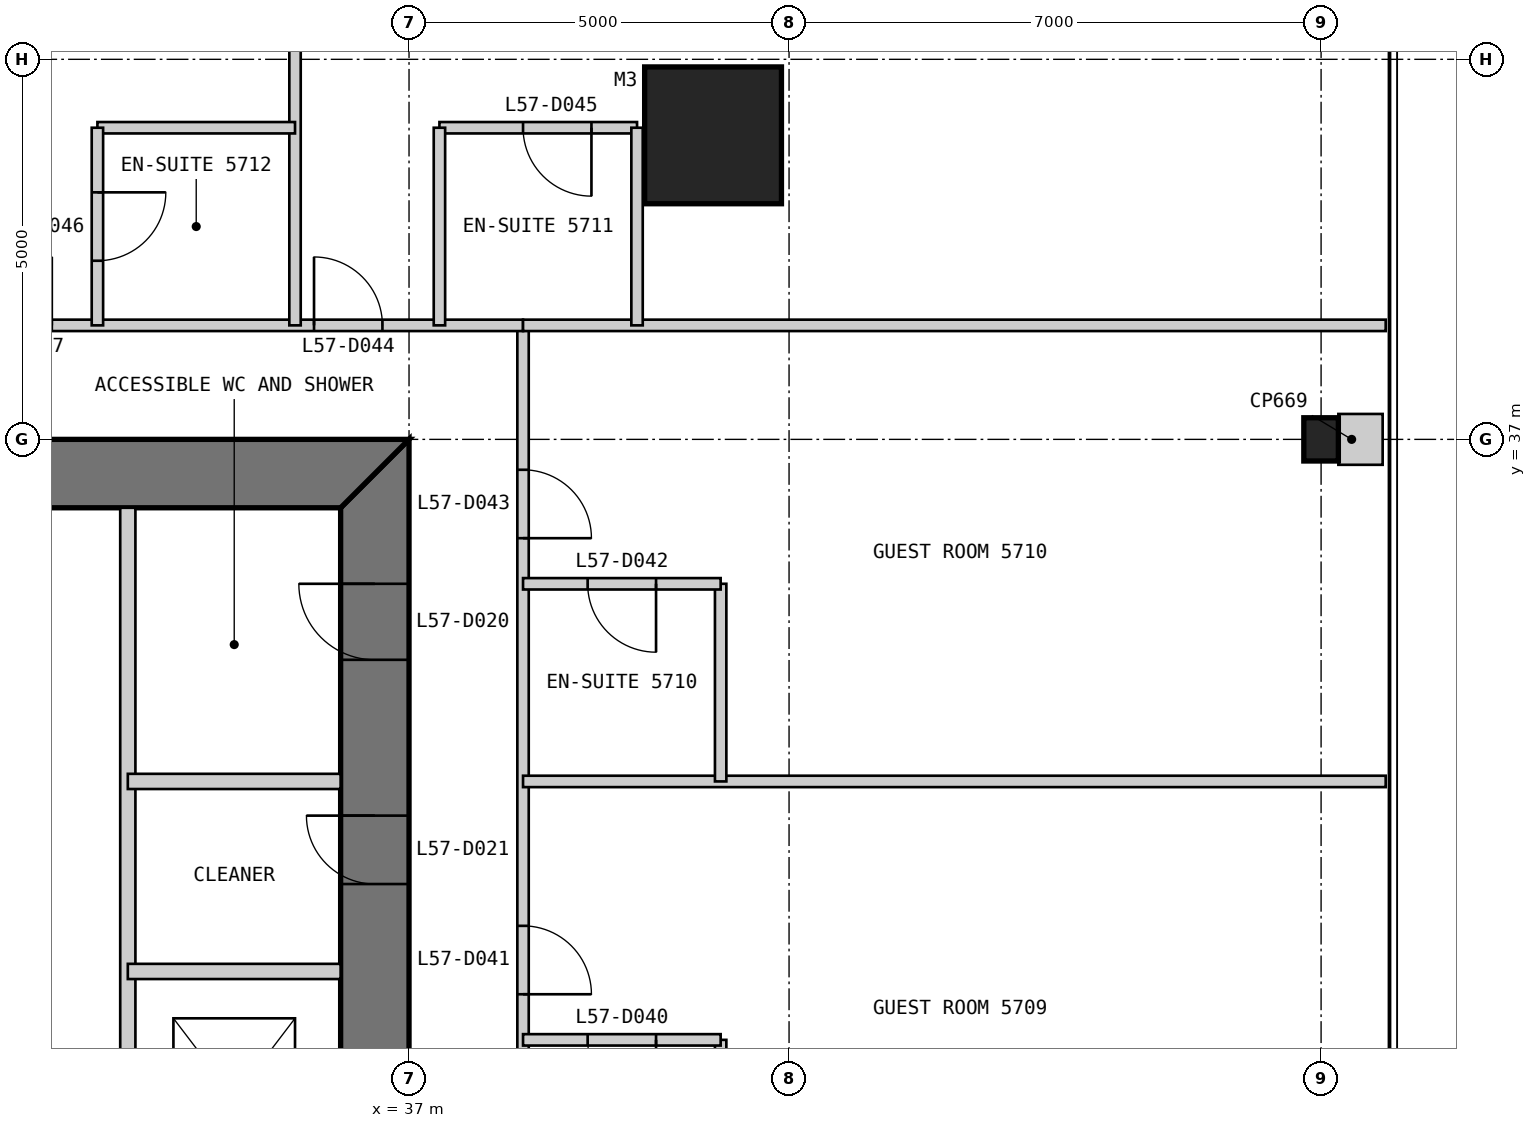
"""IFC4 building model, lengths in metres.
Left out: names, types, materials, properties, quantities, classifications, styles, units other than length and angle.
Written with IfcOpenShell. Run it as: python <this file> out.ifc"""

import sys

from ifc_helpers import new_model, si_unit, direction, frame, frame_2d, origin, origin_2d, place, context, subcontext, project, spatial, polyline, rectangle, i_section, outline, extrude, element, fill, save


model = new_model("IFC4")
c1 = context("Model", 3, precision=1e-05, world=origin(), true_north=direction((0.0, 1.0)))
c2 = subcontext(c1, "Body", "Model", "MODEL_VIEW")
j1 = project(units=[si_unit("LENGTHUNIT", "METRE"), si_unit("PLANEANGLEUNIT", "RADIAN")], contexts=[c1])
p1 = place(None, origin())
s1 = spatial("IfcSite", under=j1, at=p1, CompositionType="ELEMENT")
p2 = place(p1, origin())
s2 = spatial("IfcBuilding", under=s1, at=p2, CompositionType="ELEMENT")
p3 = place(p2, frame((0.0, 0.0, 245.8)))
s3 = spatial("IfcBuildingStorey", under=s2, at=p3, CompositionType="ELEMENT", Elevation=245.8)
p4 = place(p3, frame((41.0, 41.0, 0.0), z_axis=(0.0, 0.0, 1.0), x_axis=(1.0, 0.0, 0.0)))
e1 = element("IfcColumn", 1, at=p4, inside=s3, PredefinedType="COLUMN", context=c2, shape_type="SweptSolid", body=[
    extrude(rectangle(XDim=1.8, YDim=1.8, at=origin_2d()), origin(), (0.0, 0.0, 1.0), 3.4),
])
p5 = place(p3, frame((49.0, 37.0, 0.0), z_axis=(0.0, 0.0, 1.0), x_axis=(1.0, 0.0, 0.0)))
e2 = element("IfcColumn", 2, at=p5, inside=s3, PredefinedType="COLUMN", context=c2, shape_type="SweptSolid", body=[
    extrude(i_section(OverallWidth=0.455, OverallDepth=0.569, WebThickness=0.078, FlangeThickness=0.125, at=origin_2d()), origin(), (0.0, 0.0, 1.0), 3.4),
])
p6 = place(p3, frame((36.55, 13.9, 0.0), z_axis=(0.0, 0.0, 1.0), x_axis=(0.0, 1.0, 0.0)))
e3 = element("IfcWall", 3, at=p6, inside=s3, PredefinedType="SHEAR", context=c2, shape_type="SweptSolid", body=[
    extrude(outline(polyline([(-0.9, -0.45), (23.1, -0.45), (22.2, 0.45), (0.0, 0.45), (-0.9, -0.45)])), origin(), (0.0, 0.0, 1.0), 3.4),
])
p7 = place(p6, frame((20.2, 0.0, 0.0)))
e4 = element("IfcOpeningElement", 4, at=p7, cuts=e3, PredefinedType="OPENING", context=c2, shape_type="SweptSolid", body=[
    extrude(rectangle(XDim=1.0, YDim=2.2, at=frame_2d((0.5, 1.1))), frame((0.0, 0.46, 0.0), z_axis=(0.0, -1.0, 0.0), x_axis=(1.0, 0.0, 0.0)), (0.0, 0.0, 1.0), 0.92),
])
p8 = place(p6, frame((17.25, 0.0, 0.0)))
e5 = element("IfcOpeningElement", 5, at=p8, cuts=e3, PredefinedType="OPENING", context=c2, shape_type="SweptSolid", body=[
    extrude(rectangle(XDim=0.9, YDim=2.2, at=frame_2d((0.45, 1.1))), frame((0.0, 0.46, 0.0), z_axis=(0.0, -1.0, 0.0), x_axis=(1.0, 0.0, 0.0)), (0.0, 0.0, 1.0), 0.92),
])
p9 = place(p3, frame((37.0, 36.55, 0.0), z_axis=(0.0, 0.0, 1.0), x_axis=(-1.0, 0.0, 0.0)))
e6 = element("IfcWall", 6, at=p9, inside=s3, PredefinedType="SHEAR", context=c2, shape_type="SweptSolid", body=[
    extrude(outline(polyline([(0.0, -0.45), (24.0, -0.45), (23.1, 0.45), (0.9, 0.45), (0.0, -0.45)])), origin(), (0.0, 0.0, 1.0), 3.4),
])
p10 = place(p9, frame((4.9, 0.0, 0.0)))
e7 = element("IfcOpeningElement", 7, at=p10, cuts=e6, PredefinedType="OPENING", context=c2, shape_type="SweptSolid", body=[
    extrude(rectangle(XDim=1.0, YDim=2.2, at=frame_2d((0.5, 1.1))), frame((0.0, 0.46, 0.0), z_axis=(0.0, -1.0, 0.0), x_axis=(1.0, 0.0, 0.0)), (0.0, 0.0, 1.0), 0.92),
])
p11 = place(p9, frame((8.9, 0.0, 0.0)))
e8 = element("IfcOpeningElement", 8, at=p11, cuts=e6, PredefinedType="OPENING", context=c2, shape_type="SweptSolid", body=[
    extrude(rectangle(XDim=1.1, YDim=2.2, at=frame_2d((0.55, 1.1))), frame((0.0, 0.46, 0.0), z_axis=(0.0, -1.0, 0.0), x_axis=(1.0, 0.0, 0.0)), (0.0, 0.0, 1.0), 0.92),
])
p12 = place(p9, frame((15.05, 0.0, 0.0)))
e9 = element("IfcOpeningElement", 9, at=p12, cuts=e6, PredefinedType="OPENING", context=c2, shape_type="SweptSolid", body=[
    extrude(rectangle(XDim=0.9, YDim=2.2, at=frame_2d((0.45, 1.1))), frame((0.0, 0.46, 0.0), z_axis=(0.0, -1.0, 0.0), x_axis=(1.0, 0.0, 0.0)), (0.0, 0.0, 1.0), 0.92),
])
p13 = place(p9, frame((17.9, 0.0, 0.0)))
e10 = element("IfcOpeningElement", 10, at=p13, cuts=e6, PredefinedType="OPENING", context=c2, shape_type="SweptSolid", body=[
    extrude(rectangle(XDim=1.0, YDim=2.2, at=frame_2d((0.5, 1.1))), frame((0.0, 0.46, 0.0), z_axis=(0.0, -1.0, 0.0), x_axis=(1.0, 0.0, 0.0)), (0.0, 0.0, 1.0), 0.92),
])
p14 = place(p9, frame((21.4, 0.0, 0.0)))
e11 = element("IfcOpeningElement", 11, at=p14, cuts=e6, PredefinedType="OPENING", context=c2, shape_type="SweptSolid", body=[
    extrude(rectangle(XDim=1.0, YDim=2.2, at=frame_2d((0.5, 1.1))), frame((0.0, 0.46, 0.0), z_axis=(0.0, -1.0, 0.0), x_axis=(1.0, 0.0, 0.0)), (0.0, 0.0, 1.0), 0.92),
])
p15 = place(p3, frame((33.3, 36.1, 0.0), z_axis=(0.0, 0.0, 1.0), x_axis=(0.0, -1.0, 0.0)))
e12 = element("IfcWall", 12, at=p15, inside=s3, PredefinedType="PARTITIONING", context=c2, shape_type="SweptSolid", body=[
    extrude(rectangle(XDim=16.1, YDim=0.2, at=frame_2d((8.05, 0.0))), origin(), (0.0, 0.0, 1.0), 3.2),
])
p16 = place(p15, frame((7.217, 0.0, 0.0)))
e13 = element("IfcOpeningElement", 13, at=p16, cuts=e12, PredefinedType="OPENING", context=c2, shape_type="SweptSolid", body=[
    extrude(rectangle(XDim=1.1, YDim=2.2, at=frame_2d((0.55, 1.1))), frame((0.0, 0.11, 0.0), z_axis=(0.0, -1.0, 0.0), x_axis=(1.0, 0.0, 0.0)), (0.0, 0.0, 1.0), 0.22),
])
p17 = place(p15, frame((10.55, 0.0, 0.0)))
e14 = element("IfcOpeningElement", 14, at=p17, cuts=e12, PredefinedType="OPENING", context=c2, shape_type="SweptSolid", body=[
    extrude(rectangle(XDim=1.1, YDim=2.2, at=frame_2d((0.55, 1.1))), frame((0.0, 0.11, 0.0), z_axis=(0.0, -1.0, 0.0), x_axis=(1.0, 0.0, 0.0)), (0.0, 0.0, 1.0), 0.22),
])
p18 = place(p15, frame((13.883, 0.0, 0.0)))
e15 = element("IfcOpeningElement", 15, at=p18, cuts=e12, PredefinedType="OPENING", context=c2, shape_type="SweptSolid", body=[
    extrude(rectangle(XDim=1.1, YDim=2.2, at=frame_2d((0.55, 1.1))), frame((0.0, 0.11, 0.0), z_axis=(0.0, -1.0, 0.0), x_axis=(1.0, 0.0, 0.0)), (0.0, 0.0, 1.0), 0.22),
])
for number, where, z_axis, x_axis in (
    (16, (36.1, 30.0, 0.0), (0.0, 0.0, 1.0), (-1.0, 0.0, 0.0)),
    (17, (36.1, 32.5, 0.0), (0.0, 0.0, 1.0), (-1.0, 0.0, 0.0)),
):
    element("IfcWall", number, at=place(p3, frame(where, z_axis=z_axis, x_axis=x_axis)), inside=s3, PredefinedType="PARTITIONING", context=c2, shape_type="SweptSolid", body=[
        extrude(rectangle(XDim=2.8, YDim=0.2, at=frame_2d((1.4, 0.0))), origin(), (0.0, 0.0, 1.0), 3.2),
    ])
p19 = place(p3, frame((38.5, 11.5, 0.0), z_axis=(0.0, 0.0, 1.0), x_axis=(0.0, 1.0, 0.0)))
e18 = element("IfcWall", 18, at=p19, inside=s3, PredefinedType="PARTITIONING", context=c2, shape_type="SweptSolid", body=[
    extrude(rectangle(XDim=27.0, YDim=0.15, at=frame_2d((13.5, 0.0))), origin(), (0.0, 0.0, 1.0), 3.25),
])
p20 = place(p19, frame((1.85, 0.0, 0.0)))
e19 = element("IfcOpeningElement", 19, at=p20, cuts=e18, PredefinedType="OPENING", context=c2, shape_type="SweptSolid", body=[
    extrude(rectangle(XDim=0.9, YDim=2.1, at=frame_2d((0.45, 1.05))), frame((0.0, 0.085, 0.0), z_axis=(0.0, -1.0, 0.0), x_axis=(1.0, 0.0, 0.0)), (0.0, 0.0, 1.0), 0.17),
])
p21 = place(p19, frame((6.2, 0.0, 0.0)))
e20 = element("IfcOpeningElement", 20, at=p21, cuts=e18, PredefinedType="OPENING", context=c2, shape_type="SweptSolid", body=[
    extrude(rectangle(XDim=0.9, YDim=2.1, at=frame_2d((0.45, 1.05))), frame((0.0, 0.085, 0.0), z_axis=(0.0, -1.0, 0.0), x_axis=(1.0, 0.0, 0.0)), (0.0, 0.0, 1.0), 0.17),
])
p22 = place(p19, frame((12.2, 0.0, 0.0)))
e21 = element("IfcOpeningElement", 21, at=p22, cuts=e18, PredefinedType="OPENING", context=c2, shape_type="SweptSolid", body=[
    extrude(rectangle(XDim=0.9, YDim=2.1, at=frame_2d((0.45, 1.05))), frame((0.0, 0.085, 0.0), z_axis=(0.0, -1.0, 0.0), x_axis=(1.0, 0.0, 0.0)), (0.0, 0.0, 1.0), 0.17),
])
p23 = place(p19, frame((18.2, 0.0, 0.0)))
e22 = element("IfcOpeningElement", 22, at=p23, cuts=e18, PredefinedType="OPENING", context=c2, shape_type="SweptSolid", body=[
    extrude(rectangle(XDim=0.9, YDim=2.1, at=frame_2d((0.45, 1.05))), frame((0.0, 0.085, 0.0), z_axis=(0.0, -1.0, 0.0), x_axis=(1.0, 0.0, 0.0)), (0.0, 0.0, 1.0), 0.17),
])
p24 = place(p19, frame((24.2, 0.0, 0.0)))
e23 = element("IfcOpeningElement", 23, at=p24, cuts=e18, PredefinedType="OPENING", context=c2, shape_type="SweptSolid", body=[
    extrude(rectangle(XDim=0.9, YDim=2.1, at=frame_2d((0.45, 1.05))), frame((0.0, 0.085, 0.0), z_axis=(0.0, -1.0, 0.0), x_axis=(1.0, 0.0, 0.0)), (0.0, 0.0, 1.0), 0.17),
])
p25 = place(p3, frame((41.1, 26.5, 0.0), z_axis=(0.0, 0.0, 1.0), x_axis=(0.0, 1.0, 0.0)))
e24 = element("IfcWall", 24, at=p25, inside=s3, PredefinedType="PARTITIONING", context=c2, shape_type="SweptSolid", body=[
    extrude(rectangle(XDim=2.6, YDim=0.15, at=frame_2d((1.3, 0.0))), origin(), (0.0, 0.0, 1.0), 3.25),
])
p26 = place(p3, frame((41.1, 29.1, 0.0), z_axis=(0.0, 0.0, 1.0), x_axis=(-1.0, 0.0, 0.0)))
e25 = element("IfcWall", 25, at=p26, inside=s3, PredefinedType="PARTITIONING", context=c2, shape_type="SweptSolid", body=[
    extrude(rectangle(XDim=2.6, YDim=0.15, at=frame_2d((1.3, 0.0))), origin(), (0.0, 0.0, 1.0), 3.25),
])
p27 = place(p26, frame((0.85, 0.0, 0.0)))
e26 = element("IfcOpeningElement", 26, at=p27, cuts=e25, PredefinedType="OPENING", context=c2, shape_type="SweptSolid", body=[
    extrude(rectangle(XDim=0.9, YDim=2.1, at=frame_2d((0.45, 1.05))), frame((0.0, 0.085, 0.0), z_axis=(0.0, -1.0, 0.0), x_axis=(1.0, 0.0, 0.0)), (0.0, 0.0, 1.0), 0.17),
])
p28 = place(p3, frame((49.85, 32.5, 0.0), z_axis=(0.0, 0.0, 1.0), x_axis=(-1.0, 0.0, 0.0)))
e27 = element("IfcWall", 27, at=p28, inside=s3, PredefinedType="PARTITIONING", context=c2, shape_type="SweptSolid", body=[
    extrude(rectangle(XDim=11.35, YDim=0.15, at=frame_2d((5.675, 0.0))), origin(), (0.0, 0.0, 1.0), 3.25),
])
p29 = place(p3, frame((41.1, 32.5, 0.0), z_axis=(0.0, 0.0, 1.0), x_axis=(0.0, 1.0, 0.0)))
e28 = element("IfcWall", 28, at=p29, inside=s3, PredefinedType="PARTITIONING", context=c2, shape_type="SweptSolid", body=[
    extrude(rectangle(XDim=2.6, YDim=0.15, at=frame_2d((1.3, 0.0))), origin(), (0.0, 0.0, 1.0), 3.25),
])
p30 = place(p3, frame((41.1, 35.1, 0.0), z_axis=(0.0, 0.0, 1.0), x_axis=(-1.0, 0.0, 0.0)))
e29 = element("IfcWall", 29, at=p30, inside=s3, PredefinedType="PARTITIONING", context=c2, shape_type="SweptSolid", body=[
    extrude(rectangle(XDim=2.6, YDim=0.15, at=frame_2d((1.3, 0.0))), origin(), (0.0, 0.0, 1.0), 3.25),
])
p31 = place(p30, frame((0.85, 0.0, 0.0)))
e30 = element("IfcOpeningElement", 30, at=p31, cuts=e29, PredefinedType="OPENING", context=c2, shape_type="SweptSolid", body=[
    extrude(rectangle(XDim=0.9, YDim=2.1, at=frame_2d((0.45, 1.05))), frame((0.0, 0.085, 0.0), z_axis=(0.0, -1.0, 0.0), x_axis=(1.0, 0.0, 0.0)), (0.0, 0.0, 1.0), 0.17),
])
p32 = place(p3, frame((38.5, 38.5, 0.0), z_axis=(0.0, 0.0, 1.0), x_axis=(-1.0, 0.0, 0.0)))
e31 = element("IfcWall", 31, at=p32, inside=s3, PredefinedType="PARTITIONING", context=c2, shape_type="SweptSolid", body=[
    extrude(rectangle(XDim=27.0, YDim=0.15, at=frame_2d((13.5, 0.0))), origin(), (0.0, 0.0, 1.0), 3.25),
])
p33 = place(p32, frame((1.85, 0.0, 0.0)))
e32 = element("IfcOpeningElement", 32, at=p33, cuts=e31, PredefinedType="OPENING", context=c2, shape_type="SweptSolid", body=[
    extrude(rectangle(XDim=0.9, YDim=2.1, at=frame_2d((0.45, 1.05))), frame((0.0, 0.085, 0.0), z_axis=(0.0, -1.0, 0.0), x_axis=(1.0, 0.0, 0.0)), (0.0, 0.0, 1.0), 0.17),
])
p34 = place(p32, frame((6.2, 0.0, 0.0)))
e33 = element("IfcOpeningElement", 33, at=p34, cuts=e31, PredefinedType="OPENING", context=c2, shape_type="SweptSolid", body=[
    extrude(rectangle(XDim=0.9, YDim=2.1, at=frame_2d((0.45, 1.05))), frame((0.0, 0.085, 0.0), z_axis=(0.0, -1.0, 0.0), x_axis=(1.0, 0.0, 0.0)), (0.0, 0.0, 1.0), 0.17),
])
p35 = place(p32, frame((12.8, 0.0, 0.0)))
e34 = element("IfcOpeningElement", 34, at=p35, cuts=e31, PredefinedType="OPENING", context=c2, shape_type="SweptSolid", body=[
    extrude(rectangle(XDim=1.0, YDim=2.1, at=frame_2d((0.5, 1.05))), frame((0.0, 0.085, 0.0), z_axis=(0.0, -1.0, 0.0), x_axis=(1.0, 0.0, 0.0)), (0.0, 0.0, 1.0), 0.17),
])
p36 = place(p32, frame((18.2, 0.0, 0.0)))
e35 = element("IfcOpeningElement", 35, at=p36, cuts=e31, PredefinedType="OPENING", context=c2, shape_type="SweptSolid", body=[
    extrude(rectangle(XDim=0.9, YDim=2.1, at=frame_2d((0.45, 1.05))), frame((0.0, 0.085, 0.0), z_axis=(0.0, -1.0, 0.0), x_axis=(1.0, 0.0, 0.0)), (0.0, 0.0, 1.0), 0.17),
])
p37 = place(p32, frame((24.2, 0.0, 0.0)))
e36 = element("IfcOpeningElement", 36, at=p37, cuts=e31, PredefinedType="OPENING", context=c2, shape_type="SweptSolid", body=[
    extrude(rectangle(XDim=0.9, YDim=2.1, at=frame_2d((0.45, 1.05))), frame((0.0, 0.085, 0.0), z_axis=(0.0, -1.0, 0.0), x_axis=(1.0, 0.0, 0.0)), (0.0, 0.0, 1.0), 0.17),
])
p38 = place(p3, frame((49.85, 38.5, 0.0), z_axis=(0.0, 0.0, 1.0), x_axis=(-1.0, 0.0, 0.0)))
e37 = element("IfcWall", 37, at=p38, inside=s3, PredefinedType="PARTITIONING", context=c2, shape_type="SweptSolid", body=[
    extrude(rectangle(XDim=11.35, YDim=0.15, at=frame_2d((5.675, 0.0))), origin(), (0.0, 0.0, 1.0), 3.25),
])
p39 = place(p3, frame((40.0, 41.1, 0.0), z_axis=(0.0, 0.0, 1.0), x_axis=(-1.0, 0.0, 0.0)))
e38 = element("IfcWall", 38, at=p39, inside=s3, PredefinedType="PARTITIONING", context=c2, shape_type="SweptSolid", body=[
    extrude(rectangle(XDim=2.6, YDim=0.15, at=frame_2d((1.3, 0.0))), origin(), (0.0, 0.0, 1.0), 2.638),
])
p40 = place(p39, frame((0.6, 0.0, 0.0)))
e39 = element("IfcOpeningElement", 39, at=p40, cuts=e38, PredefinedType="OPENING", context=c2, shape_type="SweptSolid", body=[
    extrude(rectangle(XDim=0.9, YDim=2.1, at=frame_2d((0.45, 1.05))), frame((0.0, 0.085, 0.0), z_axis=(0.0, -1.0, 0.0), x_axis=(1.0, 0.0, 0.0)), (0.0, 0.0, 1.0), 0.17),
])
for number, where, z_axis, x_axis in (
    (40, (40.0, 41.1, 0.0), (0.0, 0.0, 1.0), (0.0, -1.0, 0.0)),
    (41, (37.4, 41.1, 0.0), (0.0, 0.0, 1.0), (0.0, -1.0, 0.0)),
):
    element("IfcWall", number, at=place(p3, frame(where, z_axis=z_axis, x_axis=x_axis)), inside=s3, PredefinedType="PARTITIONING", context=c2, shape_type="SweptSolid", body=[
        extrude(rectangle(XDim=2.6, YDim=0.15, at=frame_2d((1.3, 0.0))), origin(), (0.0, 0.0, 1.0), 3.25),
    ])
p41 = place(p3, frame((35.5, 49.85, 0.0), z_axis=(0.0, 0.0, 1.0), x_axis=(0.0, -1.0, 0.0)))
e42 = element("IfcWall", 42, at=p41, inside=s3, PredefinedType="PARTITIONING", context=c2, shape_type="SweptSolid", body=[
    extrude(rectangle(XDim=11.35, YDim=0.15, at=frame_2d((5.675, 0.0))), origin(), (0.0, 0.0, 1.0), 3.25),
])
p42 = place(p3, frame((35.5, 41.1, 0.0), z_axis=(0.0, 0.0, 1.0), x_axis=(-1.0, 0.0, 0.0)))
e43 = element("IfcWall", 43, at=p42, inside=s3, PredefinedType="PARTITIONING", context=c2, shape_type="SweptSolid", body=[
    extrude(rectangle(XDim=2.6, YDim=0.15, at=frame_2d((1.3, 0.0))), origin(), (0.0, 0.0, 1.0), 3.25),
])
p43 = place(p3, frame((32.9, 41.1, 0.0), z_axis=(0.0, 0.0, 1.0), x_axis=(0.0, -1.0, 0.0)))
e44 = element("IfcWall", 44, at=p43, inside=s3, PredefinedType="PARTITIONING", context=c2, shape_type="SweptSolid", body=[
    extrude(rectangle(XDim=2.6, YDim=0.15, at=frame_2d((1.3, 0.0))), origin(), (0.0, 0.0, 1.0), 3.25),
])
p44 = place(p43, frame((0.85, 0.0, 0.0)))
e45 = element("IfcOpeningElement", 45, at=p44, cuts=e44, PredefinedType="OPENING", context=c2, shape_type="SweptSolid", body=[
    extrude(rectangle(XDim=0.9, YDim=2.1, at=frame_2d((0.45, 1.05))), frame((0.0, 0.085, 0.0), z_axis=(0.0, -1.0, 0.0), x_axis=(1.0, 0.0, 0.0)), (0.0, 0.0, 1.0), 0.17),
])
p45 = place(p3, frame((49.81, 37.0, 0.0), z_axis=(0.0, 0.0, 1.0), x_axis=(-1.0, 0.0, 0.0)))
e46 = element("IfcWall", 46, at=p45, inside=s3, PredefinedType="PARTITIONING", context=c2, shape_type="SweptSolid", body=[
    extrude(rectangle(XDim=0.583, YDim=0.669, at=frame_2d((0.292, 0.0))), origin(), (0.0, 0.0, 1.0), 3.25),
])
p46 = place(p7, origin())
e47 = element("IfcDoor", 47, at=p46, inside=s3, OperationType="SINGLE_SWING_RIGHT", PredefinedType="DOOR", context=c2, shape_type="SweptSolid", body=[
    extrude(rectangle(XDim=1.0, YDim=2.2, at=frame_2d((0.5, 1.1))), frame((0.0, 0.025, 0.0), z_axis=(0.0, -1.0, 0.0), x_axis=(1.0, 0.0, 0.0)), (0.0, 0.0, 1.0), 0.05),
    extrude(outline(polyline([(0.0, 0.0), (0.04, 0.0), (0.04, 2.16), (0.96, 2.16), (0.96, 0.0), (1.0, 0.0), (1.0, 2.2), (0.0, 2.2), (0.0, 0.0)])), frame((0.0, 0.3, 0.0), z_axis=(0.0, -1.0, 0.0), x_axis=(1.0, 0.0, 0.0)), (0.0, 0.0, 1.0), 0.6),
])
fill(e4, e47)
p47 = place(p8, origin())
e48 = element("IfcDoor", 48, at=p47, inside=s3, OperationType="SINGLE_SWING_RIGHT", PredefinedType="DOOR", context=c2, shape_type="SweptSolid", body=[
    extrude(rectangle(XDim=0.9, YDim=2.2, at=frame_2d((0.45, 1.1))), frame((0.0, 0.025, 0.0), z_axis=(0.0, -1.0, 0.0), x_axis=(1.0, 0.0, 0.0)), (0.0, 0.0, 1.0), 0.05),
    extrude(outline(polyline([(0.0, 0.0), (0.04, 0.0), (0.04, 2.16), (0.86, 2.16), (0.86, 0.0), (0.9, 0.0), (0.9, 2.2), (0.0, 2.2), (0.0, 0.0)])), frame((0.0, 0.3, 0.0), z_axis=(0.0, -1.0, 0.0), x_axis=(1.0, 0.0, 0.0)), (0.0, 0.0, 1.0), 0.6),
])
fill(e5, e48)
p48 = place(p27, origin())
e49 = element("IfcDoor", 49, at=p48, inside=s3, OperationType="SINGLE_SWING_LEFT", PredefinedType="DOOR", context=c2, shape_type="SweptSolid", body=[
    extrude(rectangle(XDim=0.9, YDim=2.1, at=frame_2d((0.45, 1.05))), frame((0.0, 0.025, 0.0), z_axis=(0.0, -1.0, 0.0), x_axis=(1.0, 0.0, 0.0)), (0.0, 0.0, 1.0), 0.05),
])
fill(e26, e49)
p49 = place(p23, frame((0.9, 0.0, 0.0), z_axis=(0.0, 0.0, 1.0), x_axis=(-1.0, 0.0, 0.0)))
e50 = element("IfcDoor", 50, at=p49, inside=s3, OperationType="SINGLE_SWING_RIGHT", PredefinedType="DOOR", context=c2, shape_type="SweptSolid", body=[
    extrude(rectangle(XDim=0.9, YDim=2.1, at=frame_2d((0.45, 1.05))), frame((0.0, 0.025, 0.0), z_axis=(0.0, -1.0, 0.0), x_axis=(1.0, 0.0, 0.0)), (0.0, 0.0, 1.0), 0.05),
])
fill(e22, e50)
p50 = place(p31, origin())
e51 = element("IfcDoor", 51, at=p50, inside=s3, OperationType="SINGLE_SWING_LEFT", PredefinedType="DOOR", context=c2, shape_type="SweptSolid", body=[
    extrude(rectangle(XDim=0.9, YDim=2.1, at=frame_2d((0.45, 1.05))), frame((0.0, 0.025, 0.0), z_axis=(0.0, -1.0, 0.0), x_axis=(1.0, 0.0, 0.0)), (0.0, 0.0, 1.0), 0.05),
])
fill(e30, e51)
p51 = place(p24, frame((0.9, 0.0, 0.0), z_axis=(0.0, 0.0, 1.0), x_axis=(-1.0, 0.0, 0.0)))
e52 = element("IfcDoor", 52, at=p51, inside=s3, OperationType="SINGLE_SWING_RIGHT", PredefinedType="DOOR", context=c2, shape_type="SweptSolid", body=[
    extrude(rectangle(XDim=0.9, YDim=2.1, at=frame_2d((0.45, 1.05))), frame((0.0, 0.025, 0.0), z_axis=(0.0, -1.0, 0.0), x_axis=(1.0, 0.0, 0.0)), (0.0, 0.0, 1.0), 0.05),
])
fill(e23, e52)
p52 = place(p33, frame((0.9, 0.0, 0.0), z_axis=(0.0, 0.0, 1.0), x_axis=(-1.0, 0.0, 0.0)))
e53 = element("IfcDoor", 53, at=p52, inside=s3, OperationType="SINGLE_SWING_LEFT", PredefinedType="DOOR", context=c2, shape_type="SweptSolid", body=[
    extrude(rectangle(XDim=0.9, YDim=2.1, at=frame_2d((0.45, 1.05))), frame((0.0, 0.025, 0.0), z_axis=(0.0, -1.0, 0.0), x_axis=(1.0, 0.0, 0.0)), (0.0, 0.0, 1.0), 0.05),
])
fill(e32, e53)
p53 = place(p40, origin())
e54 = element("IfcDoor", 54, at=p53, inside=s3, OperationType="SINGLE_SWING_LEFT", PredefinedType="DOOR", context=c2, shape_type="SweptSolid", body=[
    extrude(rectangle(XDim=0.9, YDim=2.1, at=frame_2d((0.45, 1.05))), frame((0.0, 0.025, 0.0), z_axis=(0.0, -1.0, 0.0), x_axis=(1.0, 0.0, 0.0)), (0.0, 0.0, 1.0), 0.05),
])
fill(e39, e54)
p54 = place(p44, origin())
e55 = element("IfcDoor", 55, at=p54, inside=s3, OperationType="SINGLE_SWING_LEFT", PredefinedType="DOOR", context=c2, shape_type="SweptSolid", body=[
    extrude(rectangle(XDim=0.9, YDim=2.1, at=frame_2d((0.45, 1.05))), frame((0.0, 0.025, 0.0), z_axis=(0.0, -1.0, 0.0), x_axis=(1.0, 0.0, 0.0)), (0.0, 0.0, 1.0), 0.05),
])
fill(e45, e55)
save(model, sys.argv[1])
